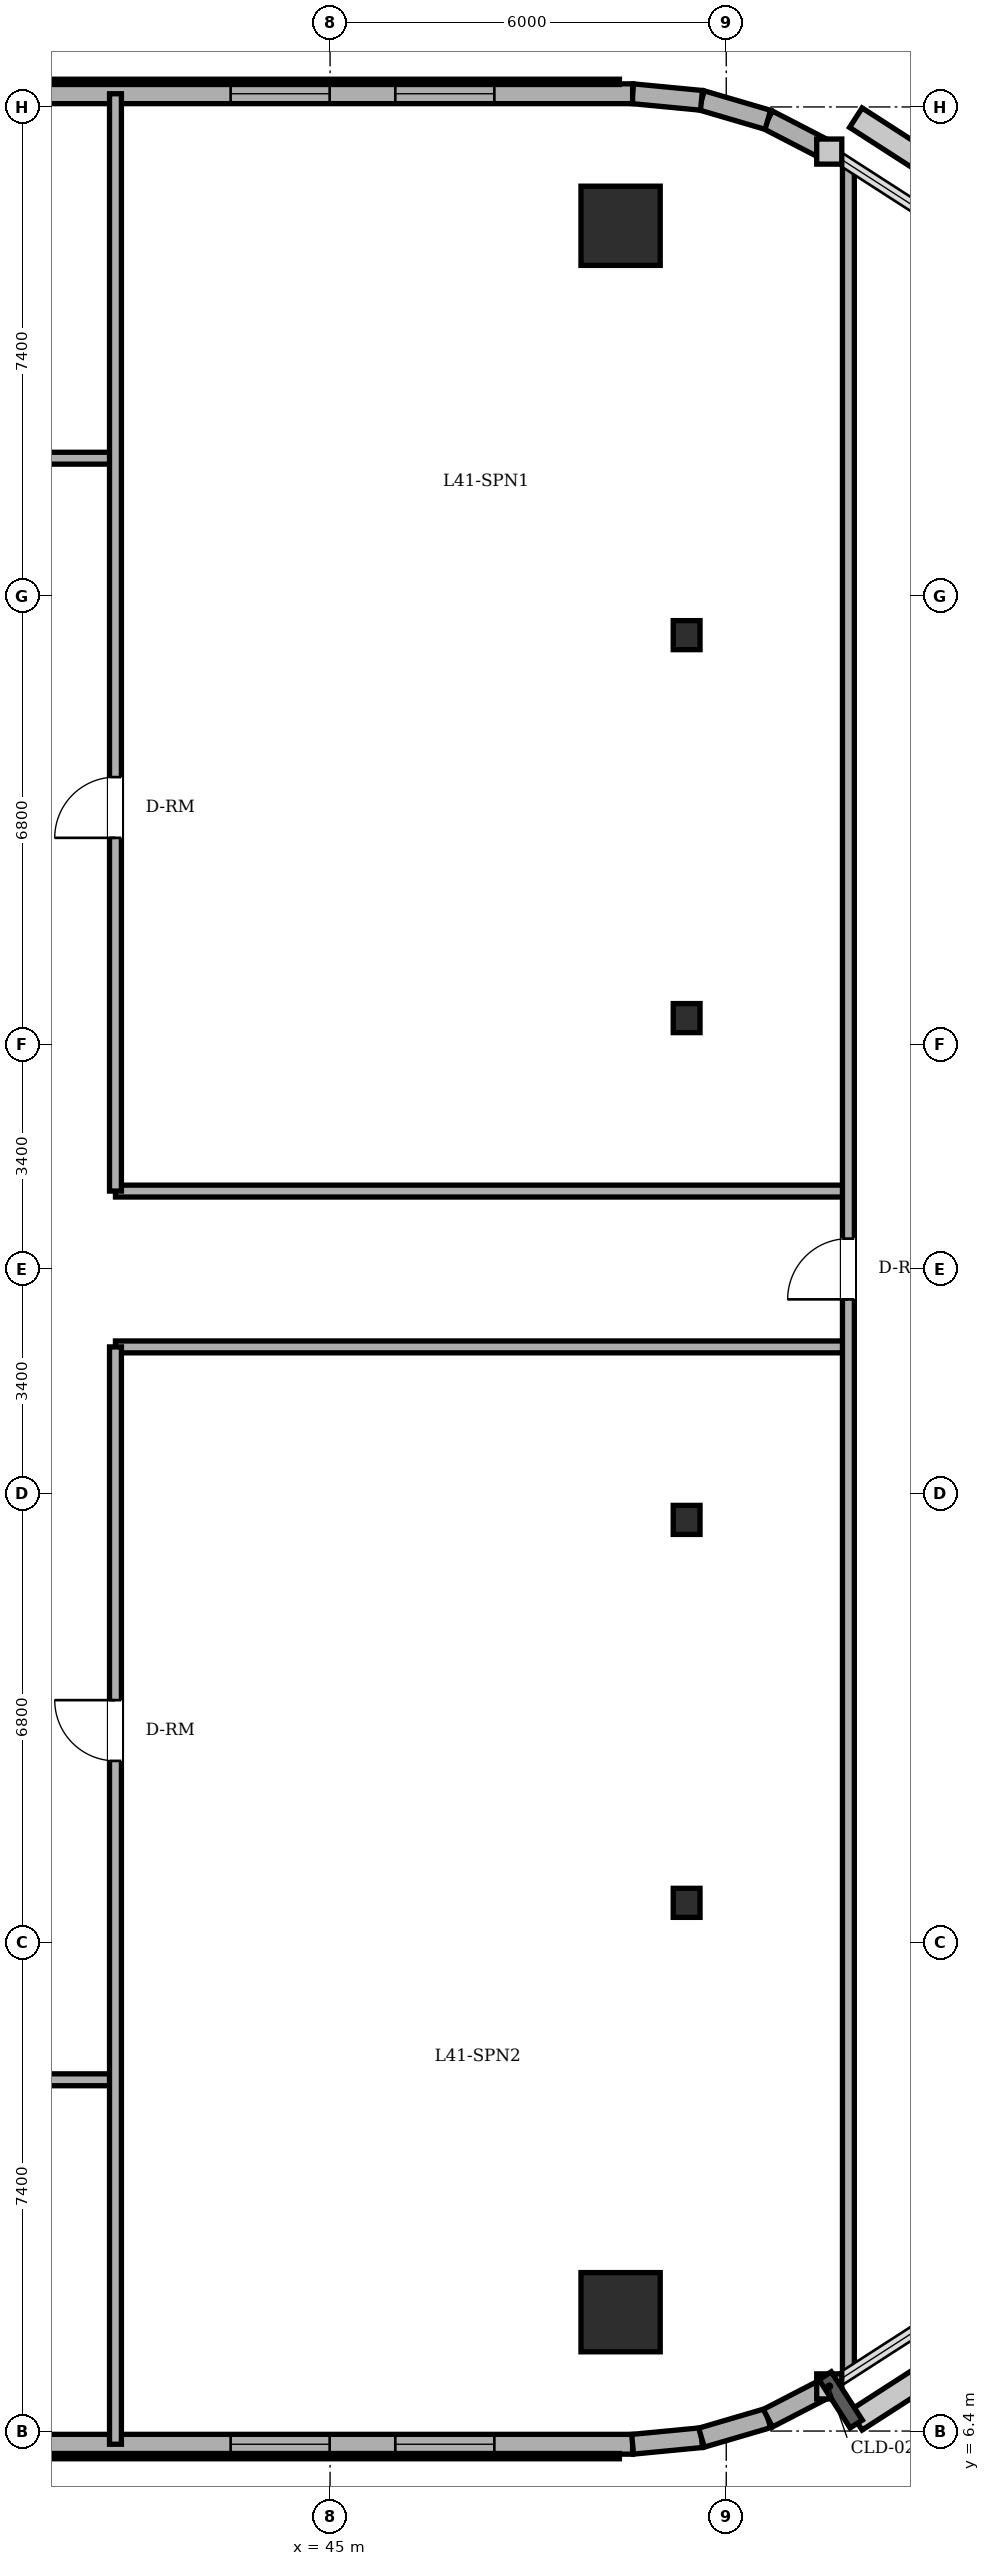
"""IFC4 building model, lengths in metres.
Left out: names, types, materials, properties, quantities, classifications, styles, units other than length and angle.
Written with IfcOpenShell. Run it as: python <this file> out.ifc"""

import sys

from ifc_helpers import new_model, si_unit, direction, frame, frame_2d, origin, origin_2d, place, context, subcontext, project, spatial, rectangle, circle, i_section, extrude, element, fill, save


model = new_model("IFC4")
c1 = context("Model", 3, precision=1e-05, world=origin(), true_north=direction((0.0, 1.0)))
c2 = subcontext(c1, "Body", "Model", "MODEL_VIEW")
j1 = project(units=[si_unit("LENGTHUNIT", "METRE"), si_unit("PLANEANGLEUNIT", "RADIAN")], contexts=[c1])
p1 = place(None, origin())
s1 = spatial("IfcSite", under=j1, at=p1, CompositionType="ELEMENT")
p2 = place(p1, origin())
s2 = spatial("IfcBuilding", under=s1, at=p2, CompositionType="ELEMENT")
p3 = place(p2, frame((0.0, 0.0, 158.2)))
s3 = spatial("IfcBuildingStorey", under=s2, at=p3, CompositionType="ELEMENT", Elevation=158.2)
for number, where, z_axis, x_axis in (
    (1, (49.4, 8.2, 0.0), (0.0, 0.0, 1.0), (1.0, 0.0, 0.0)),
    (2, (49.4, 39.8, 0.0), (0.0, 0.0, 1.0), (1.0, 0.0, 0.0)),
):
    element("IfcColumn", number, at=place(p3, frame(where, z_axis=z_axis, x_axis=x_axis)), inside=s3, PredefinedType="COLUMN", context=c2, shape_type="SweptSolid", body=[
        extrude(circle(Radius=0.6, at=origin_2d()), origin(), (0.0, 0.0, 1.0), 3.6),
    ])
for number, where, z_axis, x_axis in (
    (3, (50.4, 14.4, 0.0), (0.0, 0.0, 1.0), (1.0, 0.0, 0.0)),
    (4, (50.4, 20.2, 0.0), (0.0, 0.0, 1.0), (1.0, 0.0, 0.0)),
    (5, (50.4, 27.8, 0.0), (0.0, 0.0, 1.0), (1.0, 0.0, 0.0)),
    (6, (50.4, 33.6, 0.0), (0.0, 0.0, 1.0), (1.0, 0.0, 0.0)),
):
    element("IfcColumn", number, at=place(p3, frame(where, z_axis=z_axis, x_axis=x_axis)), inside=s3, PredefinedType="COLUMN", context=c2, shape_type="SweptSolid", body=[
        extrude(i_section(OverallWidth=0.406, OverallDepth=0.44, WebThickness=0.024, FlangeThickness=0.039, FilletRadius=0.015, at=origin_2d()), origin(), (0.0, 0.0, 1.0), 3.6),
    ])
p4 = place(p3, frame((19.3, 6.2, 0.0), z_axis=(0.0, 0.0, 1.0), x_axis=(1.0, 0.0, 0.0)))
e7 = element("IfcWall", 7, at=p4, inside=s3, PredefinedType="SOLIDWALL", context=c2, shape_type="SweptSolid", body=[
    extrude(rectangle(XDim=30.282, YDim=0.3, at=frame_2d((15.141, 0.0))), origin(), (0.0, 0.0, 1.0), 3.4),
])
p5 = place(p4, frame((15.425, 0.0, 0.0)))
e8 = element("IfcOpeningElement", 8, at=p5, cuts=e7, PredefinedType="OPENING", context=c2, shape_type="SweptSolid", body=[
    extrude(rectangle(XDim=0.95, YDim=2.2, at=frame_2d((0.475, 1.1))), frame((0.0, 0.16, 0.0), z_axis=(0.0, -1.0, 0.0), x_axis=(1.0, 0.0, 0.0)), (0.0, 0.0, 1.0), 0.32),
])
p6 = place(p4, frame((1.25, 0.0, 0.85)))
e9 = element("IfcOpeningElement", 9, at=p6, cuts=e7, PredefinedType="OPENING", context=c2, shape_type="SweptSolid", body=[
    extrude(rectangle(XDim=1.5, YDim=1.55, at=frame_2d((0.75, 0.775))), frame((0.0, 0.16, 0.0), z_axis=(0.0, -1.0, 0.0), x_axis=(1.0, 0.0, 0.0)), (0.0, 0.0, 1.0), 0.32),
])
p7 = place(p4, frame((2.9, 0.0, 0.85)))
e10 = element("IfcOpeningElement", 10, at=p7, cuts=e7, PredefinedType="OPENING", context=c2, shape_type="SweptSolid", body=[
    extrude(rectangle(XDim=1.5, YDim=1.55, at=frame_2d((0.75, 0.775))), frame((0.0, 0.16, 0.0), z_axis=(0.0, -1.0, 0.0), x_axis=(1.0, 0.0, 0.0)), (0.0, 0.0, 1.0), 0.32),
])
p8 = place(p4, frame((6.45, 0.0, 0.85)))
e11 = element("IfcOpeningElement", 11, at=p8, cuts=e7, PredefinedType="OPENING", context=c2, shape_type="SweptSolid", body=[
    extrude(rectangle(XDim=1.5, YDim=1.55, at=frame_2d((0.75, 0.775))), frame((0.0, 0.16, 0.0), z_axis=(0.0, -1.0, 0.0), x_axis=(1.0, 0.0, 0.0)), (0.0, 0.0, 1.0), 0.32),
])
p9 = place(p4, frame((12.8, 0.0, 0.85)))
e12 = element("IfcOpeningElement", 12, at=p9, cuts=e7, PredefinedType="OPENING", context=c2, shape_type="SweptSolid", body=[
    extrude(rectangle(XDim=1.5, YDim=1.55, at=frame_2d((0.75, 0.775))), frame((0.0, 0.16, 0.0), z_axis=(0.0, -1.0, 0.0), x_axis=(1.0, 0.0, 0.0)), (0.0, 0.0, 1.0), 0.32),
])
p10 = place(p4, frame((17.25, 0.0, 0.85)))
e13 = element("IfcOpeningElement", 13, at=p10, cuts=e7, PredefinedType="OPENING", context=c2, shape_type="SweptSolid", body=[
    extrude(rectangle(XDim=1.5, YDim=1.55, at=frame_2d((0.75, 0.775))), frame((0.0, 0.16, 0.0), z_axis=(0.0, -1.0, 0.0), x_axis=(1.0, 0.0, 0.0)), (0.0, 0.0, 1.0), 0.32),
])
p11 = place(p4, frame((24.194, 0.0, 0.85)))
e14 = element("IfcOpeningElement", 14, at=p11, cuts=e7, PredefinedType="OPENING", context=c2, shape_type="SweptSolid", body=[
    extrude(rectangle(XDim=1.5, YDim=1.55, at=frame_2d((0.75, 0.775))), frame((0.0, 0.16, 0.0), z_axis=(0.0, -1.0, 0.0), x_axis=(1.0, 0.0, 0.0)), (0.0, 0.0, 1.0), 0.32),
])
p12 = place(p4, frame((26.688, 0.0, 0.85)))
e15 = element("IfcOpeningElement", 15, at=p12, cuts=e7, PredefinedType="OPENING", context=c2, shape_type="SweptSolid", body=[
    extrude(rectangle(XDim=1.5, YDim=1.55, at=frame_2d((0.75, 0.775))), frame((0.0, 0.16, 0.0), z_axis=(0.0, -1.0, 0.0), x_axis=(1.0, 0.0, 0.0)), (0.0, 0.0, 1.0), 0.32),
])
p13 = place(p3, frame((49.582, 6.2, 0.0), z_axis=(0.0, 0.0, 1.0), x_axis=(0.995426089968, 0.095534807324, 0.0)))
e16 = element("IfcWall", 16, at=p13, inside=s3, PredefinedType="SOLIDWALL", context=c2, shape_type="SweptSolid", body=[
    extrude(rectangle(XDim=1.048, YDim=0.3, at=frame_2d((0.524, 0.0))), origin(), (0.0, 0.0, 1.0), 3.4),
])
p14 = place(p3, frame((50.625, 6.3, 0.0), z_axis=(0.0, 0.0, 1.0), x_axis=(0.959528674476, 0.281610942363, 0.0)))
e17 = element("IfcWall", 17, at=p14, inside=s3, PredefinedType="SOLIDWALL", context=c2, shape_type="SweptSolid", body=[
    extrude(rectangle(XDim=1.047, YDim=0.3, at=frame_2d((0.524, 0.0))), origin(), (0.0, 0.0, 1.0), 3.4),
])
for number, where, z_axis, x_axis in (
    (18, (51.63, 6.595, 0.0), (0.0, 0.0, 1.0), (0.888, 0.459, 0.0)),
    (19, (52.56, 40.924, 0.0), (0.0, 0.0, 1.0), (-0.888, 0.459, 0.0)),
):
    element("IfcWall", number, at=place(p3, frame(where, z_axis=z_axis, x_axis=x_axis)), inside=s3, PredefinedType="SOLIDWALL", context=c2, shape_type="SweptSolid", body=[
        extrude(rectangle(XDim=1.047, YDim=0.3, at=frame_2d((0.523, 0.0))), origin(), (0.0, 0.0, 1.0), 3.4),
    ])
p15 = place(p3, frame((51.63, 41.405, 0.0), z_axis=(0.0, 0.0, 1.0), x_axis=(-0.959528674476, 0.281610942363, 0.0)))
e20 = element("IfcWall", 20, at=p15, inside=s3, PredefinedType="SOLIDWALL", context=c2, shape_type="SweptSolid", body=[
    extrude(rectangle(XDim=1.047, YDim=0.3, at=frame_2d((0.524, 0.0))), origin(), (0.0, 0.0, 1.0), 3.4),
])
p16 = place(p3, frame((50.625, 41.7, 0.0), z_axis=(0.0, 0.0, 1.0), x_axis=(-0.995426089968, 0.095534807324, 0.0)))
e21 = element("IfcWall", 21, at=p16, inside=s3, PredefinedType="SOLIDWALL", context=c2, shape_type="SweptSolid", body=[
    extrude(rectangle(XDim=1.048, YDim=0.3, at=frame_2d((0.524, 0.0))), origin(), (0.0, 0.0, 1.0), 3.4),
])
p17 = place(p3, frame((49.582, 41.8, 0.0), z_axis=(0.0, 0.0, 1.0), x_axis=(-1.0, 0.0, 0.0)))
e22 = element("IfcWall", 22, at=p17, inside=s3, PredefinedType="SOLIDWALL", context=c2, shape_type="SweptSolid", body=[
    extrude(rectangle(XDim=30.282, YDim=0.3, at=frame_2d((15.141, 0.0))), origin(), (0.0, 0.0, 1.0), 3.4),
])
p18 = place(p17, frame((15.407, 0.0, 0.0)))
e23 = element("IfcOpeningElement", 23, at=p18, cuts=e22, PredefinedType="OPENING", context=c2, shape_type="SweptSolid", body=[
    extrude(rectangle(XDim=0.95, YDim=2.2, at=frame_2d((0.475, 1.1))), frame((0.0, 0.16, 0.0), z_axis=(0.0, -1.0, 0.0), x_axis=(1.0, 0.0, 0.0)), (0.0, 0.0, 1.0), 0.32),
])
p19 = place(p17, frame((2.094, 0.0, 0.85)))
e24 = element("IfcOpeningElement", 24, at=p19, cuts=e22, PredefinedType="OPENING", context=c2, shape_type="SweptSolid", body=[
    extrude(rectangle(XDim=1.5, YDim=1.55, at=frame_2d((0.75, 0.775))), frame((0.0, 0.16, 0.0), z_axis=(0.0, -1.0, 0.0), x_axis=(1.0, 0.0, 0.0)), (0.0, 0.0, 1.0), 0.32),
])
p20 = place(p17, frame((4.588, 0.0, 0.85)))
e25 = element("IfcOpeningElement", 25, at=p20, cuts=e22, PredefinedType="OPENING", context=c2, shape_type="SweptSolid", body=[
    extrude(rectangle(XDim=1.5, YDim=1.55, at=frame_2d((0.75, 0.775))), frame((0.0, 0.16, 0.0), z_axis=(0.0, -1.0, 0.0), x_axis=(1.0, 0.0, 0.0)), (0.0, 0.0, 1.0), 0.32),
])
p21 = place(p17, frame((10.399, 0.0, 0.85)))
e26 = element("IfcOpeningElement", 26, at=p21, cuts=e22, PredefinedType="OPENING", context=c2, shape_type="SweptSolid", body=[
    extrude(rectangle(XDim=1.5, YDim=1.55, at=frame_2d((0.75, 0.775))), frame((0.0, 0.16, 0.0), z_axis=(0.0, -1.0, 0.0), x_axis=(1.0, 0.0, 0.0)), (0.0, 0.0, 1.0), 0.32),
])
p22 = place(p17, frame((18.932, 0.0, 0.85)))
e27 = element("IfcOpeningElement", 27, at=p22, cuts=e22, PredefinedType="OPENING", context=c2, shape_type="SweptSolid", body=[
    extrude(rectangle(XDim=1.5, YDim=1.55, at=frame_2d((0.75, 0.775))), frame((0.0, 0.16, 0.0), z_axis=(0.0, -1.0, 0.0), x_axis=(1.0, 0.0, 0.0)), (0.0, 0.0, 1.0), 0.32),
])
p23 = place(p17, frame((22.532, 0.0, 0.85)))
e28 = element("IfcOpeningElement", 28, at=p23, cuts=e22, PredefinedType="OPENING", context=c2, shape_type="SweptSolid", body=[
    extrude(rectangle(XDim=1.5, YDim=1.55, at=frame_2d((0.75, 0.775))), frame((0.0, 0.16, 0.0), z_axis=(0.0, -1.0, 0.0), x_axis=(1.0, 0.0, 0.0)), (0.0, 0.0, 1.0), 0.32),
])
p24 = place(p17, frame((25.882, 0.0, 0.85)))
e29 = element("IfcOpeningElement", 29, at=p24, cuts=e22, PredefinedType="OPENING", context=c2, shape_type="SweptSolid", body=[
    extrude(rectangle(XDim=1.5, YDim=1.55, at=frame_2d((0.75, 0.775))), frame((0.0, 0.16, 0.0), z_axis=(0.0, -1.0, 0.0), x_axis=(1.0, 0.0, 0.0)), (0.0, 0.0, 1.0), 0.32),
])
p25 = place(p17, frame((27.532, 0.0, 0.85)))
e30 = element("IfcOpeningElement", 30, at=p25, cuts=e22, PredefinedType="OPENING", context=c2, shape_type="SweptSolid", body=[
    extrude(rectangle(XDim=1.5, YDim=1.55, at=frame_2d((0.75, 0.775))), frame((0.0, 0.16, 0.0), z_axis=(0.0, -1.0, 0.0), x_axis=(1.0, 0.0, 0.0)), (0.0, 0.0, 1.0), 0.32),
])
p26 = place(p3, frame((13.8, 11.72, 0.0), z_axis=(0.0, 0.0, 1.0), x_axis=(1.0, 0.0, 0.0)))
e31 = element("IfcWall", 31, at=p26, inside=s3, PredefinedType="PARTITIONING", context=c2, shape_type="SweptSolid", body=[
    extrude(rectangle(XDim=27.95, YDim=0.18, at=frame_2d((13.975, 0.0))), origin(), (0.0, 0.0, 1.0), 3.4),
])
p27 = place(p26, frame((12.24, 0.0, 0.0)))
e32 = element("IfcOpeningElement", 32, at=p27, cuts=e31, PredefinedType="OPENING", context=c2, shape_type="SweptSolid", body=[
    extrude(rectangle(XDim=0.92, YDim=2.1, at=frame_2d((0.46, 1.05))), frame((0.0, 0.1, 0.0), z_axis=(0.0, -1.0, 0.0), x_axis=(1.0, 0.0, 0.0)), (0.0, 0.0, 1.0), 0.2),
])
p28 = place(p26, frame((5.54, 0.0, 0.0)))
e33 = element("IfcOpeningElement", 33, at=p28, cuts=e31, PredefinedType="OPENING", context=c2, shape_type="SweptSolid", body=[
    extrude(rectangle(XDim=0.92, YDim=2.1, at=frame_2d((0.46, 1.05))), frame((0.0, 0.1, 0.0), z_axis=(0.0, -1.0, 0.0), x_axis=(1.0, 0.0, 0.0)), (0.0, 0.0, 1.0), 0.2),
])
p29 = place(p26, frame((20.555, 0.0, 0.0)))
e34 = element("IfcOpeningElement", 34, at=p29, cuts=e31, PredefinedType="OPENING", context=c2, shape_type="SweptSolid", body=[
    extrude(rectangle(XDim=0.92, YDim=2.1, at=frame_2d((0.46, 1.05))), frame((0.0, 0.1, 0.0), z_axis=(0.0, -1.0, 0.0), x_axis=(1.0, 0.0, 0.0)), (0.0, 0.0, 1.0), 0.2),
])
for number, where, z_axis, x_axis in (
    (35, (41.75, 22.82, 0.0), (0.0, 0.0, 1.0), (1.0, 0.0, 0.0)),
    (36, (41.75, 25.18, 0.0), (0.0, 0.0, 1.0), (1.0, 0.0, 0.0)),
):
    element("IfcWall", number, at=place(p3, frame(where, z_axis=z_axis, x_axis=x_axis)), inside=s3, PredefinedType="PARTITIONING", context=c2, shape_type="SweptSolid", body=[
        extrude(rectangle(XDim=11.1, YDim=0.18, at=frame_2d((5.55, 0.0))), origin(), (0.0, 0.0, 1.0), 3.4),
    ])
p30 = place(p3, frame((13.8, 36.28, 0.0), z_axis=(0.0, 0.0, 1.0), x_axis=(1.0, 0.0, 0.0)))
e37 = element("IfcWall", 37, at=p30, inside=s3, PredefinedType="PARTITIONING", context=c2, shape_type="SweptSolid", body=[
    extrude(rectangle(XDim=27.95, YDim=0.18, at=frame_2d((13.975, 0.0))), origin(), (0.0, 0.0, 1.0), 3.4),
])
p31 = place(p30, frame((12.05, 0.0, 0.0)))
e38 = element("IfcOpeningElement", 38, at=p31, cuts=e37, PredefinedType="OPENING", context=c2, shape_type="SweptSolid", body=[
    extrude(rectangle(XDim=0.9, YDim=2.1, at=frame_2d((0.45, 1.05))), frame((0.0, 0.1, 0.0), z_axis=(0.0, -1.0, 0.0), x_axis=(1.0, 0.0, 0.0)), (0.0, 0.0, 1.0), 0.2),
])
p32 = place(p30, frame((15.67, 0.0, 0.0)))
e39 = element("IfcOpeningElement", 39, at=p32, cuts=e37, PredefinedType="OPENING", context=c2, shape_type="SweptSolid", body=[
    extrude(rectangle(XDim=0.86, YDim=2.1, at=frame_2d((0.43, 1.05))), frame((0.0, 0.1, 0.0), z_axis=(0.0, -1.0, 0.0), x_axis=(1.0, 0.0, 0.0)), (0.0, 0.0, 1.0), 0.2),
])
p33 = place(p30, frame((5.54, 0.0, 0.0)))
e40 = element("IfcOpeningElement", 40, at=p33, cuts=e37, PredefinedType="OPENING", context=c2, shape_type="SweptSolid", body=[
    extrude(rectangle(XDim=0.92, YDim=2.1, at=frame_2d((0.46, 1.05))), frame((0.0, 0.1, 0.0), z_axis=(0.0, -1.0, 0.0), x_axis=(1.0, 0.0, 0.0)), (0.0, 0.0, 1.0), 0.2),
])
p34 = place(p30, frame((22.215, 0.0, 0.0)))
e41 = element("IfcOpeningElement", 41, at=p34, cuts=e37, PredefinedType="OPENING", context=c2, shape_type="SweptSolid", body=[
    extrude(rectangle(XDim=1.0, YDim=2.15, at=frame_2d((0.5, 1.075))), frame((0.0, 0.1, 0.0), z_axis=(0.0, -1.0, 0.0), x_axis=(1.0, 0.0, 0.0)), (0.0, 0.0, 1.0), 0.2),
])
p35 = place(p3, frame((41.75, 6.2, 0.0), z_axis=(0.0, 0.0, 1.0), x_axis=(0.0, 1.0, 0.0)))
e42 = element("IfcWall", 42, at=p35, inside=s3, PredefinedType="PARTITIONING", context=c2, shape_type="SweptSolid", body=[
    extrude(rectangle(XDim=16.62, YDim=0.18, at=frame_2d((8.31, 0.0))), origin(), (0.0, 0.0, 1.0), 3.4),
])
p36 = place(p35, frame((10.35, 0.0, 0.0)))
e43 = element("IfcOpeningElement", 43, at=p36, cuts=e42, PredefinedType="OPENING", context=c2, shape_type="SweptSolid", body=[
    extrude(rectangle(XDim=0.92, YDim=2.1, at=frame_2d((0.46, 1.05))), frame((0.0, 0.1, 0.0), z_axis=(0.0, -1.0, 0.0), x_axis=(1.0, 0.0, 0.0)), (0.0, 0.0, 1.0), 0.2),
])
p37 = place(p3, frame((41.75, 25.18, 0.0), z_axis=(0.0, 0.0, 1.0), x_axis=(0.0, 1.0, 0.0)))
e44 = element("IfcWall", 44, at=p37, inside=s3, PredefinedType="PARTITIONING", context=c2, shape_type="SweptSolid", body=[
    extrude(rectangle(XDim=16.62, YDim=0.18, at=frame_2d((8.31, 0.0))), origin(), (0.0, 0.0, 1.0), 3.4),
])
p38 = place(p37, frame((5.35, 0.0, 0.0)))
e45 = element("IfcOpeningElement", 45, at=p38, cuts=e44, PredefinedType="OPENING", context=c2, shape_type="SweptSolid", body=[
    extrude(rectangle(XDim=0.92, YDim=2.1, at=frame_2d((0.46, 1.05))), frame((0.0, 0.1, 0.0), z_axis=(0.0, -1.0, 0.0), x_axis=(1.0, 0.0, 0.0)), (0.0, 0.0, 1.0), 0.2),
])
p39 = place(p3, frame((52.85, 7.263, 0.0), z_axis=(0.0, 0.0, 1.0), x_axis=(0.0, 1.0, 0.0)))
e46 = element("IfcWall", 46, at=p39, inside=s3, PredefinedType="PARTITIONING", context=c2, shape_type="SweptSolid", body=[
    extrude(rectangle(XDim=33.474, YDim=0.18, at=frame_2d((16.737, 0.0))), origin(), (0.0, 0.0, 1.0), 3.4),
])
p40 = place(p39, frame((16.277, 0.0, 0.0)))
e47 = element("IfcOpeningElement", 47, at=p40, cuts=e46, PredefinedType="OPENING", context=c2, shape_type="SweptSolid", body=[
    extrude(rectangle(XDim=0.92, YDim=2.1, at=frame_2d((0.46, 1.05))), frame((0.0, 0.1, 0.0), z_axis=(0.0, -1.0, 0.0), x_axis=(1.0, 0.0, 0.0)), (0.0, 0.0, 1.0), 0.2),
])
p41 = place(p11, origin())
e48 = element("IfcWindow", 48, at=p41, inside=s3, PartitioningType="DOUBLE_PANEL_VERTICAL", PredefinedType="WINDOW", context=c2, shape_type="SweptSolid", body=[
    extrude(rectangle(XDim=1.5, YDim=1.55, at=frame_2d((0.75, 0.775))), frame((0.0, 0.03, 0.0), z_axis=(0.0, -1.0, 0.0), x_axis=(1.0, 0.0, 0.0)), (0.0, 0.0, 1.0), 0.06),
])
fill(e14, e48)
p42 = place(p12, origin())
e49 = element("IfcWindow", 49, at=p42, inside=s3, PartitioningType="DOUBLE_PANEL_VERTICAL", PredefinedType="WINDOW", context=c2, shape_type="SweptSolid", body=[
    extrude(rectangle(XDim=1.5, YDim=1.55, at=frame_2d((0.75, 0.775))), frame((0.0, 0.03, 0.0), z_axis=(0.0, -1.0, 0.0), x_axis=(1.0, 0.0, 0.0)), (0.0, 0.0, 1.0), 0.06),
])
fill(e15, e49)
p43 = place(p19, origin())
e50 = element("IfcWindow", 50, at=p43, inside=s3, PartitioningType="DOUBLE_PANEL_VERTICAL", PredefinedType="WINDOW", context=c2, shape_type="SweptSolid", body=[
    extrude(rectangle(XDim=1.5, YDim=1.55, at=frame_2d((0.75, 0.775))), frame((0.0, 0.03, 0.0), z_axis=(0.0, -1.0, 0.0), x_axis=(1.0, 0.0, 0.0)), (0.0, 0.0, 1.0), 0.06),
])
fill(e24, e50)
p44 = place(p20, origin())
e51 = element("IfcWindow", 51, at=p44, inside=s3, PartitioningType="DOUBLE_PANEL_VERTICAL", PredefinedType="WINDOW", context=c2, shape_type="SweptSolid", body=[
    extrude(rectangle(XDim=1.5, YDim=1.55, at=frame_2d((0.75, 0.775))), frame((0.0, 0.03, 0.0), z_axis=(0.0, -1.0, 0.0), x_axis=(1.0, 0.0, 0.0)), (0.0, 0.0, 1.0), 0.06),
])
fill(e25, e51)
p45 = place(p38, origin())
e52 = element("IfcDoor", 52, at=p45, inside=s3, OperationType="SINGLE_SWING_LEFT", PredefinedType="DOOR", context=c2, shape_type="SweptSolid", body=[
    extrude(rectangle(XDim=0.92, YDim=2.1, at=frame_2d((0.46, 1.05))), frame((0.0, 0.025, 0.0), z_axis=(0.0, -1.0, 0.0), x_axis=(1.0, 0.0, 0.0)), (0.0, 0.0, 1.0), 0.05),
])
fill(e45, e52)
p46 = place(p36, origin())
e53 = element("IfcDoor", 53, at=p46, inside=s3, OperationType="SINGLE_SWING_RIGHT", PredefinedType="DOOR", context=c2, shape_type="SweptSolid", body=[
    extrude(rectangle(XDim=0.92, YDim=2.1, at=frame_2d((0.46, 1.05))), frame((0.0, 0.025, 0.0), z_axis=(0.0, -1.0, 0.0), x_axis=(1.0, 0.0, 0.0)), (0.0, 0.0, 1.0), 0.05),
])
fill(e43, e53)
p47 = place(p40, origin())
e54 = element("IfcDoor", 54, at=p47, inside=s3, OperationType="SINGLE_SWING_LEFT", PredefinedType="DOOR", context=c2, shape_type="SweptSolid", body=[
    extrude(rectangle(XDim=0.92, YDim=2.1, at=frame_2d((0.46, 1.05))), frame((0.0, 0.025, 0.0), z_axis=(0.0, -1.0, 0.0), x_axis=(1.0, 0.0, 0.0)), (0.0, 0.0, 1.0), 0.05),
])
fill(e47, e54)
save(model, sys.argv[1])
